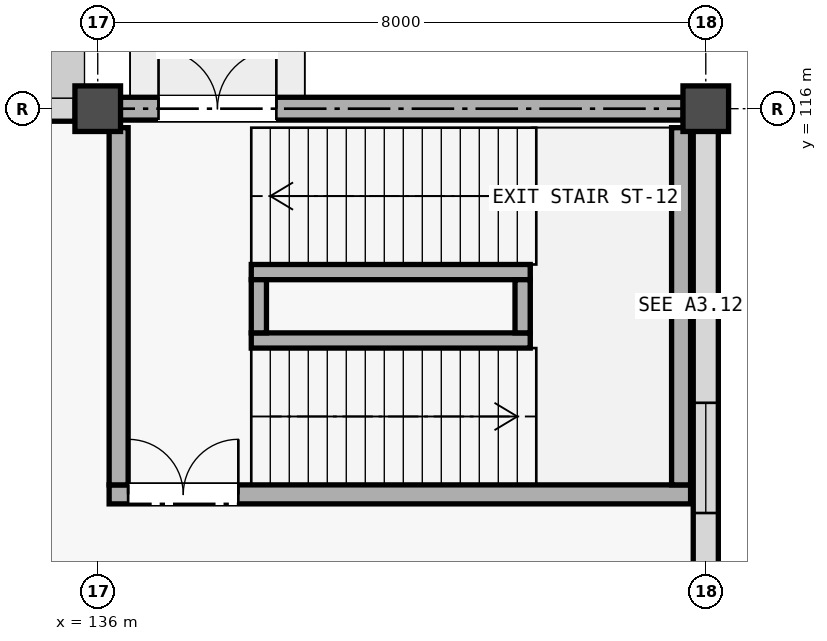
"""IFC4 building model, lengths in metres.
Left out: names, types, materials, properties, quantities, classifications, styles, units other than length and angle.
Written with IfcOpenShell. Run it as: python <this file> out.ifc"""

import sys

from ifc_helpers import new_model, si_unit, direction, frame, frame_2d, origin, origin_2d, place, context, subcontext, project, spatial, rectangle, extrude, element, fill, save


model = new_model("IFC4")
c1 = context("Model", 3, precision=1e-05, world=origin(), true_north=direction((0.0, 1.0)))
c2 = subcontext(c1, "Body", "Model", "MODEL_VIEW")
j1 = project(units=[si_unit("LENGTHUNIT", "METRE"), si_unit("PLANEANGLEUNIT", "RADIAN")], contexts=[c1])
p1 = place(None, origin())
s1 = spatial("IfcSite", under=j1, at=p1, CompositionType="ELEMENT")
p2 = place(p1, origin())
s2 = spatial("IfcBuilding", under=s1, at=p2, CompositionType="ELEMENT")
p3 = place(p2, origin())
s3 = spatial("IfcBuildingStorey", under=s2, at=p3, CompositionType="ELEMENT", Elevation=0.0)
for number, where, z_axis, x_axis in (
    (1, (136.0, 116.0, 0.0), (0.0, 0.0, 1.0), (1.0, 0.0, 0.0)),
    (2, (144.0, 116.0, 0.0), (0.0, 0.0, 1.0), (1.0, 0.0, 0.0)),
):
    element("IfcColumn", number, at=place(p3, frame(where, z_axis=z_axis, x_axis=x_axis)), inside=s3, PredefinedType="COLUMN", context=c2, shape_type="SweptSolid", body=[
        extrude(rectangle(XDim=0.6, YDim=0.6, at=origin_2d()), origin(), (0.0, 0.0, 1.0), 5.125),
    ])
p4 = place(p3, frame((128.296, 116.0, 0.0), z_axis=(0.0, 0.0, 1.0), x_axis=(1.0, 0.0, 0.0)))
e3 = element("IfcWall", 3, at=p4, inside=s3, PredefinedType="STANDARD", context=c2, shape_type="SweptSolid", body=[
    extrude(rectangle(XDim=7.408, YDim=0.33, at=frame_2d((3.704, 0.0))), origin(), (0.0, 0.0, 1.0), 4.25),
])
p5 = place(p4, frame((1.084, 0.0, 1.45)))
e4 = element("IfcOpeningElement", 4, at=p5, cuts=e3, PredefinedType="OPENING", context=c2, shape_type="SweptSolid", body=[
    extrude(rectangle(XDim=1.75, YDim=1.55, at=frame_2d((0.875, 0.775))), frame((0.0, 0.175, 0.0), z_axis=(0.0, -1.0, 0.0), x_axis=(1.0, 0.0, 0.0)), (0.0, 0.0, 1.0), 0.35),
])
p6 = place(p4, frame((4.284, 0.0, 1.45)))
e5 = element("IfcOpeningElement", 5, at=p6, cuts=e3, PredefinedType="OPENING", context=c2, shape_type="SweptSolid", body=[
    extrude(rectangle(XDim=1.8, YDim=1.8, at=frame_2d((0.9, 0.9))), frame((0.0, 0.175, 0.0), z_axis=(0.0, -1.0, 0.0), x_axis=(1.0, 0.0, 0.0)), (0.0, 0.0, 1.0), 0.35),
])
p7 = place(p3, frame((136.296, 116.0, 0.0), z_axis=(0.0, 0.0, 1.0), x_axis=(1.0, 0.0, 0.0)))
e6 = element("IfcWall", 6, at=p7, inside=s3, PredefinedType="SHEAR", context=c2, shape_type="SweptSolid", body=[
    extrude(rectangle(XDim=7.408, YDim=0.3, at=frame_2d((3.704, 0.0))), origin(), (0.0, 0.0, 1.0), 5.4),
])
p8 = place(p7, frame((0.504, 0.0, 0.0)))
e7 = element("IfcOpeningElement", 7, at=p8, cuts=e6, PredefinedType="OPENING", context=c2, shape_type="SweptSolid", body=[
    extrude(rectangle(XDim=1.55, YDim=2.2, at=frame_2d((0.775, 1.1))), frame((0.0, 0.16, 0.0), z_axis=(0.0, -1.0, 0.0), x_axis=(1.0, 0.0, 0.0)), (0.0, 0.0, 1.0), 0.32),
])
p9 = place(p3, frame((144.0, 108.296, 0.0), z_axis=(0.0, 0.0, 1.0), x_axis=(0.0, 1.0, 0.0)))
e8 = element("IfcWall", 8, at=p9, inside=s3, PredefinedType="STANDARD", context=c2, shape_type="SweptSolid", body=[
    extrude(rectangle(XDim=7.408, YDim=0.33, at=frame_2d((3.704, 0.0))), origin(), (0.0, 0.0, 1.0), 4.45),
])
p10 = place(p9, frame((2.384, 0.0, 1.45)))
e9 = element("IfcOpeningElement", 9, at=p10, cuts=e8, PredefinedType="OPENING", context=c2, shape_type="SweptSolid", body=[
    extrude(rectangle(XDim=1.45, YDim=1.5, at=frame_2d((0.725, 0.75))), frame((0.0, 0.175, 0.0), z_axis=(0.0, -1.0, 0.0), x_axis=(1.0, 0.0, 0.0)), (0.0, 0.0, 1.0), 0.35),
])
p11 = place(p3, frame((136.15, 110.925, 0.0), z_axis=(0.0, 0.0, 1.0), x_axis=(1.0, 0.0, 0.0)))
e10 = element("IfcWall", 10, at=p11, inside=s3, PredefinedType="SHEAR", context=c2, shape_type="SweptSolid", body=[
    extrude(rectangle(XDim=7.65, YDim=0.25, at=frame_2d((3.825, 0.0))), origin(), (0.0, 0.0, 1.0), 5.4),
])
p12 = place(p11, frame((0.25, 0.0, 0.0)))
e11 = element("IfcOpeningElement", 11, at=p12, cuts=e10, PredefinedType="OPENING", context=c2, shape_type="SweptSolid", body=[
    extrude(rectangle(XDim=1.45, YDim=2.2, at=frame_2d((0.725, 1.1))), frame((0.0, 0.135, 0.0), z_axis=(0.0, -1.0, 0.0), x_axis=(1.0, 0.0, 0.0)), (0.0, 0.0, 1.0), 0.27),
])
for number, where, z_axis, x_axis in (
    (12, (136.275, 111.05, 0.0), (0.0, 0.0, 1.0), (0.0, 1.0, 0.0)),
    (13, (143.675, 111.05, 0.0), (0.0, 0.0, 1.0), (0.0, 1.0, 0.0)),
):
    element("IfcWall", number, at=place(p3, frame(where, z_axis=z_axis, x_axis=x_axis)), inside=s3, PredefinedType="SHEAR", context=c2, shape_type="SweptSolid", body=[
        extrude(rectangle(XDim=4.7, YDim=0.25, at=frame_2d((2.35, 0.0))), origin(), (0.0, 0.0, 1.0), 5.4),
    ])
for number, where, z_axis, x_axis in (
    (14, (138.02, 112.95, 0.0), (0.0, 0.0, 1.0), (1.0, 0.0, 0.0)),
    (15, (138.02, 113.85, 0.0), (0.0, 0.0, 1.0), (1.0, 0.0, 0.0)),
):
    element("IfcWall", number, at=place(p3, frame(where, z_axis=z_axis, x_axis=x_axis)), inside=s3, PredefinedType="SHEAR", context=c2, shape_type="SweptSolid", body=[
        extrude(rectangle(XDim=3.67, YDim=0.2, at=frame_2d((1.835, 0.0))), origin(), (0.0, 0.0, 1.0), 5.4),
    ])
for number, where, z_axis, x_axis in (
    (16, (138.12, 113.05, 0.0), (0.0, 0.0, 1.0), (0.0, 1.0, 0.0)),
    (17, (141.59, 113.05, 0.0), (0.0, 0.0, 1.0), (0.0, 1.0, 0.0)),
):
    element("IfcWall", number, at=place(p3, frame(where, z_axis=z_axis, x_axis=x_axis)), inside=s3, PredefinedType="SHEAR", context=c2, shape_type="SweptSolid", body=[
        extrude(rectangle(XDim=0.7, YDim=0.2, at=frame_2d((0.35, 0.0))), origin(), (0.0, 0.0, 1.0), 5.4),
    ])
p13 = place(p8, origin())
e18 = element("IfcDoor", 18, at=p13, inside=s3, OperationType="DOUBLE_DOOR_SINGLE_SWING", PredefinedType="DOOR", context=c2, shape_type="SweptSolid", body=[
    extrude(rectangle(XDim=1.55, YDim=2.2, at=frame_2d((0.775, 1.1))), frame((0.0, 0.025, 0.0), z_axis=(0.0, -1.0, 0.0), x_axis=(1.0, 0.0, 0.0)), (0.0, 0.0, 1.0), 0.05),
])
fill(e7, e18)
p14 = place(p10, origin())
e19 = element("IfcWindow", 19, at=p14, inside=s3, PartitioningType="SINGLE_PANEL", PredefinedType="WINDOW", context=c2, shape_type="SweptSolid", body=[
    extrude(rectangle(XDim=1.45, YDim=1.5, at=frame_2d((0.725, 0.75))), frame((0.0, 0.03, 0.0), z_axis=(0.0, -1.0, 0.0), x_axis=(1.0, 0.0, 0.0)), (0.0, 0.0, 1.0), 0.06),
])
fill(e9, e19)
p15 = place(p12, origin())
e20 = element("IfcDoor", 20, at=p15, inside=s3, OperationType="DOUBLE_DOOR_SINGLE_SWING", PredefinedType="DOOR", context=c2, shape_type="SweptSolid", body=[
    extrude(rectangle(XDim=1.45, YDim=2.2, at=frame_2d((0.725, 1.1))), frame((0.0, 0.025, 0.0), z_axis=(0.0, -1.0, 0.0), x_axis=(1.0, 0.0, 0.0)), (0.0, 0.0, 1.0), 0.05),
])
fill(e11, e20)
save(model, sys.argv[1])
